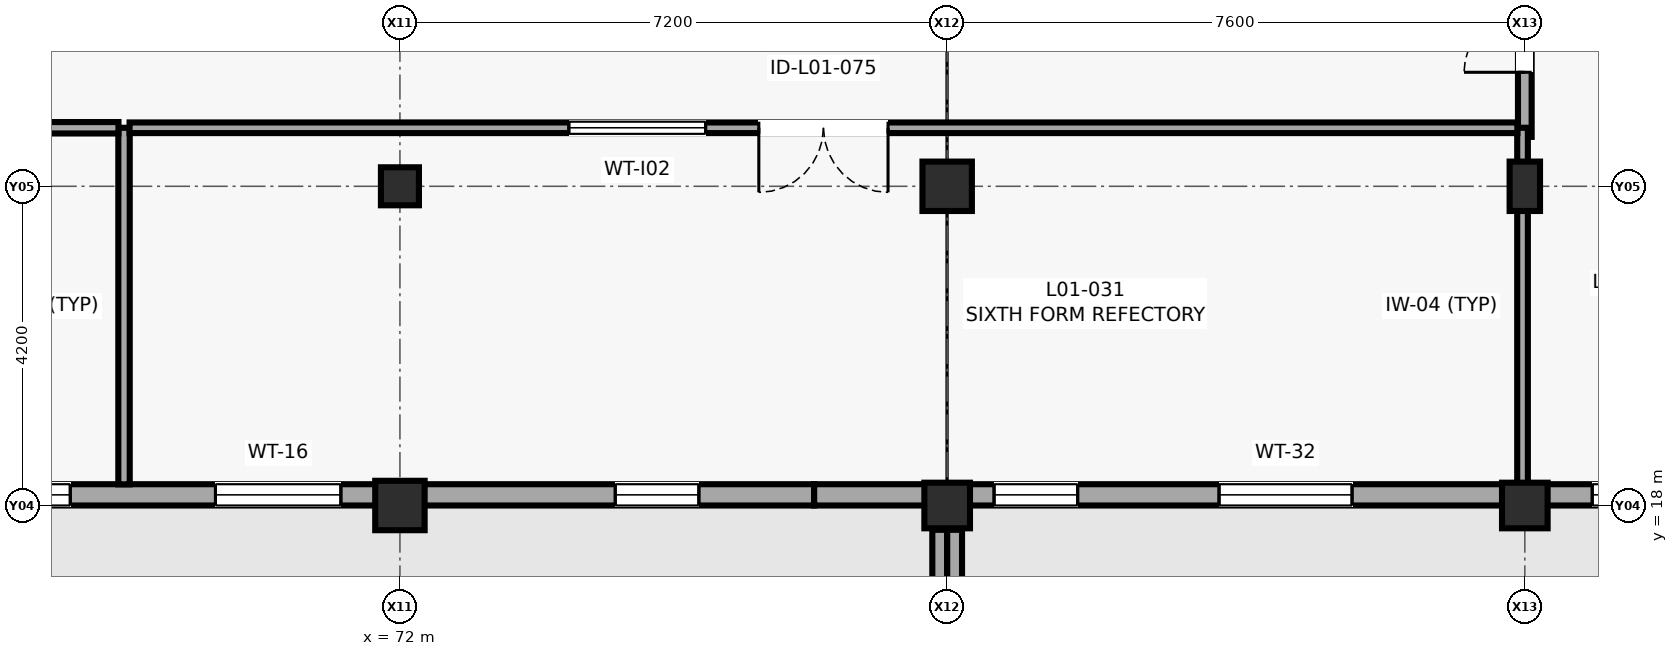
"""IFC4 building model, lengths in metres.
Left out: names, types, materials, properties, quantities, classifications, styles, units other than length and angle.
Written with IfcOpenShell. Run it as: python <this file> out.ifc"""

import sys

from ifc_helpers import new_model, si_unit, direction, frame, frame_2d, origin, origin_2d, place, context, subcontext, project, spatial, polyline, rectangle, outline, extrude, element, fill, save


model = new_model("IFC4")
c1 = context("Model", 3, precision=1e-05, world=origin(), true_north=direction((0.0, 1.0)))
c2 = subcontext(c1, "Body", "Model", "MODEL_VIEW")
j1 = project(units=[si_unit("LENGTHUNIT", "METRE"), si_unit("PLANEANGLEUNIT", "RADIAN")], contexts=[c1])
p1 = place(None, origin())
s1 = spatial("IfcSite", under=j1, at=p1, CompositionType="ELEMENT")
p2 = place(p1, origin())
s2 = spatial("IfcBuilding", under=s1, at=p2, CompositionType="ELEMENT")
p3 = place(p2, frame((0.0, 0.0, 4.2)))
s3 = spatial("IfcBuildingStorey", under=s2, at=p3, CompositionType="ELEMENT", Elevation=4.2)
p4 = place(p3, frame((72.0, 18.0, 0.0), z_axis=(0.0, 0.0, 1.0), x_axis=(1.0, 0.0, 0.0)))
e1 = element("IfcColumn", 1, at=p4, inside=s3, PredefinedType="COLUMN", context=c2, shape_type="SweptSolid", body=[
    extrude(rectangle(XDim=0.65, YDim=0.65, at=origin_2d()), origin(), (0.0, 0.0, 1.0), 4.0),
])
p5 = place(p3, frame((72.0, 22.2, 0.0), z_axis=(0.0, 0.0, 1.0), x_axis=(1.0, 0.0, 0.0)))
e2 = element("IfcColumn", 2, at=p5, inside=s3, PredefinedType="COLUMN", context=c2, shape_type="SweptSolid", body=[
    extrude(rectangle(XDim=0.5, YDim=0.5, at=origin_2d()), origin(), (0.0, 0.0, 1.0), 4.0),
])
p6 = place(p3, frame((79.2, 18.0, 0.0), z_axis=(0.0, 0.0, 1.0), x_axis=(1.0, 0.0, 0.0)))
e3 = element("IfcColumn", 3, at=p6, inside=s3, PredefinedType="COLUMN", context=c2, shape_type="SweptSolid", body=[
    extrude(rectangle(XDim=0.6, YDim=0.6, at=origin_2d()), origin(), (0.0, 0.0, 1.0), 4.0),
])
p7 = place(p3, frame((79.2, 22.2, 0.0), z_axis=(0.0, 0.0, 1.0), x_axis=(1.0, 0.0, 0.0)))
e4 = element("IfcColumn", 4, at=p7, inside=s3, PredefinedType="COLUMN", context=c2, shape_type="SweptSolid", body=[
    extrude(rectangle(XDim=0.65, YDim=0.65, at=origin_2d()), origin(), (0.0, 0.0, 1.0), 4.0),
])
p8 = place(p3, frame((86.8, 18.0, 0.0), z_axis=(0.0, 0.0, 1.0), x_axis=(1.0, 0.0, 0.0)))
e5 = element("IfcColumn", 5, at=p8, inside=s3, PredefinedType="COLUMN", context=c2, shape_type="SweptSolid", body=[
    extrude(rectangle(XDim=0.6, YDim=0.6, at=origin_2d()), origin(), (0.0, 0.0, 1.0), 4.0),
])
p9 = place(p3, frame((86.8, 22.2, 0.0), z_axis=(0.0, 0.0, 1.0), x_axis=(1.0, 0.0, 0.0)))
e6 = element("IfcColumn", 6, at=p9, inside=s3, PredefinedType="COLUMN", context=c2, shape_type="SweptSolid", body=[
    extrude(rectangle(XDim=0.4, YDim=0.65, at=origin_2d()), origin(), (0.0, 0.0, 1.0), 4.0),
])
p10 = place(p3, frame((65.046, 18.14, 0.0), z_axis=(0.0, 0.0, 1.0), x_axis=(1.0, 0.0, 0.0)))
e7 = element("IfcWall", 7, at=p10, inside=s3, PredefinedType="SOLIDWALL", context=c2, shape_type="SweptSolid", body=[
    extrude(rectangle(XDim=12.404, YDim=0.28, at=frame_2d((6.202, 0.0))), origin(), (0.0, 0.0, 1.0), 3.06),
])
p11 = place(p10, frame((0.617, 0.0, 0.75)))
e8 = element("IfcOpeningElement", 8, at=p11, cuts=e7, PredefinedType="OPENING", context=c2, shape_type="SweptSolid", body=[
    extrude(rectangle(XDim=2.0, YDim=2.1, at=frame_2d((1.0, 1.05))), frame((0.0, 0.15, 0.0), z_axis=(0.0, -1.0, 0.0), x_axis=(1.0, 0.0, 0.0)), (0.0, 0.0, 1.0), 0.3),
])
p12 = place(p10, frame((4.527, 0.0, 0.85)))
e9 = element("IfcOpeningElement", 9, at=p12, cuts=e7, PredefinedType="OPENING", context=c2, shape_type="SweptSolid", body=[
    extrude(rectangle(XDim=1.65, YDim=1.95, at=frame_2d((0.825, 0.975))), frame((0.0, 0.15, 0.0), z_axis=(0.0, -1.0, 0.0), x_axis=(1.0, 0.0, 0.0)), (0.0, 0.0, 1.0), 0.3),
])
p13 = place(p10, frame((9.787, 0.0, 0.75)))
e10 = element("IfcOpeningElement", 10, at=p13, cuts=e7, PredefinedType="OPENING", context=c2, shape_type="SweptSolid", body=[
    extrude(rectangle(XDim=1.1, YDim=2.1, at=frame_2d((0.55, 1.05))), frame((0.0, 0.15, 0.0), z_axis=(0.0, -1.0, 0.0), x_axis=(1.0, 0.0, 0.0)), (0.0, 0.0, 1.0), 0.3),
])
p14 = place(p3, frame((77.45, 18.14, 0.0), z_axis=(0.0, 0.0, 1.0), x_axis=(1.0, 0.0, 0.0)))
e11 = element("IfcWall", 11, at=p14, inside=s3, PredefinedType="SOLIDWALL", context=c2, shape_type="SweptSolid", body=[
    extrude(rectangle(XDim=12.404, YDim=0.28, at=frame_2d((6.202, 0.0))), origin(), (0.0, 0.0, 1.0), 2.91),
])
p15 = place(p14, frame((2.367, 0.0, 0.67)))
e12 = element("IfcOpeningElement", 12, at=p15, cuts=e11, PredefinedType="OPENING", context=c2, shape_type="SweptSolid", body=[
    extrude(rectangle(XDim=1.1, YDim=2.1, at=frame_2d((0.55, 1.05))), frame((0.0, 0.15, 0.0), z_axis=(0.0, -1.0, 0.0), x_axis=(1.0, 0.0, 0.0)), (0.0, 0.0, 1.0), 0.3),
])
p16 = place(p14, frame((5.327, 0.0, 0.72)))
e13 = element("IfcOpeningElement", 13, at=p16, cuts=e11, PredefinedType="OPENING", context=c2, shape_type="SweptSolid", body=[
    extrude(rectangle(XDim=1.75, YDim=2.05, at=frame_2d((0.875, 1.025))), frame((0.0, 0.15, 0.0), z_axis=(0.0, -1.0, 0.0), x_axis=(1.0, 0.0, 0.0)), (0.0, 0.0, 1.0), 0.3),
])
p17 = place(p14, frame((10.237, 0.0, 0.67)))
e14 = element("IfcOpeningElement", 14, at=p17, cuts=e11, PredefinedType="OPENING", context=c2, shape_type="SweptSolid", body=[
    extrude(rectangle(XDim=1.1, YDim=2.1, at=frame_2d((0.55, 1.05))), frame((0.0, 0.15, 0.0), z_axis=(0.0, -1.0, 0.0), x_axis=(1.0, 0.0, 0.0)), (0.0, 0.0, 1.0), 0.3),
])
for number, where, z_axis, x_axis in (
    (15, (79.102, 3.796, 0.0), (0.0, 0.0, 1.0), (0.0, 1.0, 0.0)),
    (16, (79.298, 17.68, 0.0), (0.0, 0.0, 1.0), (0.0, -1.0, 0.0)),
):
    element("IfcWall", number, at=place(p3, frame(where, z_axis=z_axis, x_axis=x_axis)), inside=s3, PredefinedType="PARAPET", context=c2, shape_type="SweptSolid", body=[
        extrude(outline(polyline([(0.0, 0.0), (13.884, 0.0), (13.884, 1.12), (9.441, 1.12), (9.391, 1.46), (4.493, 1.46), (4.443, 1.12), (0.0, 1.12), (0.0, 0.0)])), frame((0.0, 0.098, 0.0), z_axis=(0.0, -1.0, 0.0), x_axis=(1.0, 0.0, 0.0)), (0.0, 0.0, 1.0), 0.195),
    ])
p18 = place(p3, frame((86.8, 22.85, 0.0), z_axis=(0.0, 0.0, 1.0), x_axis=(0.0, 1.0, 0.0)))
e17 = element("IfcWall", 17, at=p18, inside=s3, PredefinedType="PARTITIONING", context=c2, shape_type="SweptSolid", body=[
    extrude(rectangle(XDim=3.3, YDim=0.18, at=frame_2d((1.65, 0.0))), origin(), (0.0, 0.0, 1.0), 3.175),
])
p19 = place(p18, frame((0.85, 0.0, 0.0)))
e18 = element("IfcOpeningElement", 18, at=p19, cuts=e17, PredefinedType="OPENING", context=c2, shape_type="SweptSolid", body=[
    extrude(rectangle(XDim=1.6, YDim=2.25, at=frame_2d((0.8, 1.125))), frame((0.0, 0.1, 0.0), z_axis=(0.0, -1.0, 0.0), x_axis=(1.0, 0.0, 0.0)), (0.0, 0.0, 1.0), 0.2),
])
p20 = place(p3, frame((68.37, 18.278, 0.0), z_axis=(0.0, 0.0, 1.0), x_axis=(0.0, 1.0, 0.0)))
e19 = element("IfcWall", 19, at=p20, inside=s3, PredefinedType="PARTITIONING", context=c2, shape_type="SweptSolid", body=[
    extrude(rectangle(XDim=4.692, YDim=0.15, at=frame_2d((2.346, 0.0))), origin(), (0.0, 0.0, 1.0), 3.16),
])
p21 = place(p3, frame((68.297, 22.97, 0.0), z_axis=(0.0, 0.0, 1.0), x_axis=(-1.0, 0.0, 0.0)))
e20 = element("IfcWall", 20, at=p21, inside=s3, PredefinedType="PARTITIONING", context=c2, shape_type="SweptSolid", body=[
    extrude(rectangle(XDim=17.619, YDim=0.15, at=frame_2d((8.81, 0.0))), origin(), (0.0, 0.0, 1.0), 3.76),
])
p22 = place(p21, frame((8.11, 0.0, 0.0)))
e21 = element("IfcOpeningElement", 21, at=p22, cuts=e20, PredefinedType="OPENING", context=c2, shape_type="SweptSolid", body=[
    extrude(rectangle(XDim=1.4, YDim=2.2, at=frame_2d((0.7, 1.1))), frame((0.0, 0.085, 0.0), z_axis=(0.0, -1.0, 0.0), x_axis=(1.0, 0.0, 0.0)), (0.0, 0.0, 1.0), 0.17),
])
p23 = place(p3, frame((86.77, 18.278, 0.0), z_axis=(0.0, 0.0, 1.0), x_axis=(0.0, 1.0, 0.0)))
e22 = element("IfcWall", 22, at=p23, inside=s3, PredefinedType="PARTITIONING", context=c2, shape_type="SweptSolid", body=[
    extrude(rectangle(XDim=4.692, YDim=0.14, at=frame_2d((2.346, 0.0))), origin(), (0.0, 0.0, 1.0), 3.175),
])
p24 = place(p3, frame((86.702, 22.97, 0.0), z_axis=(0.0, 0.0, 1.0), x_axis=(-1.0, 0.0, 0.0)))
e23 = element("IfcWall", 23, at=p24, inside=s3, PredefinedType="PARTITIONING", context=c2, shape_type="SweptSolid", body=[
    extrude(rectangle(XDim=18.259, YDim=0.14, at=frame_2d((9.129, 0.0))), origin(), (0.0, 0.0, 1.0), 3.76),
])
p25 = place(p24, frame((8.28, 0.0, 0.0)))
e24 = element("IfcOpeningElement", 24, at=p25, cuts=e23, PredefinedType="OPENING", context=c2, shape_type="SweptSolid", body=[
    extrude(rectangle(XDim=1.7, YDim=2.35, at=frame_2d((0.85, 1.175))), frame((0.0, 0.08, 0.0), z_axis=(0.0, -1.0, 0.0), x_axis=(1.0, 0.0, 0.0)), (0.0, 0.0, 1.0), 0.16),
])
p26 = place(p24, frame((10.68, 0.0, 1.05)))
e25 = element("IfcOpeningElement", 25, at=p26, cuts=e23, PredefinedType="OPENING", context=c2, shape_type="SweptSolid", body=[
    extrude(rectangle(XDim=1.8, YDim=1.2, at=frame_2d((0.9, 0.6))), frame((0.0, 0.08, 0.0), z_axis=(0.0, -1.0, 0.0), x_axis=(1.0, 0.0, 0.0)), (0.0, 0.0, 1.0), 0.16),
])
p27 = place(p11, origin())
e26 = element("IfcWindow", 26, at=p27, inside=s3, PartitioningType="SINGLE_PANEL", PredefinedType="WINDOW", context=c2, shape_type="SweptSolid", body=[
    extrude(rectangle(XDim=2.0, YDim=2.1, at=frame_2d((1.0, 1.05))), frame((0.0, 0.03, 0.0), z_axis=(0.0, -1.0, 0.0), x_axis=(1.0, 0.0, 0.0)), (0.0, 0.0, 1.0), 0.06),
])
fill(e8, e26)
p28 = place(p12, origin())
e27 = element("IfcWindow", 27, at=p28, inside=s3, PartitioningType="SINGLE_PANEL", PredefinedType="WINDOW", context=c2, shape_type="SweptSolid", body=[
    extrude(rectangle(XDim=1.65, YDim=1.95, at=frame_2d((0.825, 0.975))), frame((0.0, 0.03, 0.0), z_axis=(0.0, -1.0, 0.0), x_axis=(1.0, 0.0, 0.0)), (0.0, 0.0, 1.0), 0.06),
])
fill(e9, e27)
p29 = place(p13, origin())
e28 = element("IfcWindow", 28, at=p29, inside=s3, PartitioningType="SINGLE_PANEL", PredefinedType="WINDOW", context=c2, shape_type="SweptSolid", body=[
    extrude(rectangle(XDim=1.1, YDim=2.1, at=frame_2d((0.55, 1.05))), frame((0.0, 0.03, 0.0), z_axis=(0.0, -1.0, 0.0), x_axis=(1.0, 0.0, 0.0)), (0.0, 0.0, 1.0), 0.06),
])
fill(e10, e28)
p30 = place(p15, origin())
e29 = element("IfcWindow", 29, at=p30, inside=s3, PartitioningType="SINGLE_PANEL", PredefinedType="WINDOW", context=c2, shape_type="SweptSolid", body=[
    extrude(rectangle(XDim=1.1, YDim=2.1, at=frame_2d((0.55, 1.05))), frame((0.0, 0.03, 0.0), z_axis=(0.0, -1.0, 0.0), x_axis=(1.0, 0.0, 0.0)), (0.0, 0.0, 1.0), 0.06),
])
fill(e12, e29)
p31 = place(p16, origin())
e30 = element("IfcWindow", 30, at=p31, inside=s3, PartitioningType="SINGLE_PANEL", PredefinedType="WINDOW", context=c2, shape_type="SweptSolid", body=[
    extrude(rectangle(XDim=1.75, YDim=2.05, at=frame_2d((0.875, 1.025))), frame((0.0, 0.03, 0.0), z_axis=(0.0, -1.0, 0.0), x_axis=(1.0, 0.0, 0.0)), (0.0, 0.0, 1.0), 0.06),
])
fill(e13, e30)
p32 = place(p17, origin())
e31 = element("IfcWindow", 31, at=p32, inside=s3, PartitioningType="SINGLE_PANEL", PredefinedType="WINDOW", context=c2, shape_type="SweptSolid", body=[
    extrude(rectangle(XDim=1.1, YDim=2.1, at=frame_2d((0.55, 1.05))), frame((0.0, 0.03, 0.0), z_axis=(0.0, -1.0, 0.0), x_axis=(1.0, 0.0, 0.0)), (0.0, 0.0, 1.0), 0.06),
])
fill(e14, e31)
p33 = place(p19, origin())
e32 = element("IfcDoor", 32, at=p33, inside=s3, OperationType="DOUBLE_DOOR_SINGLE_SWING", PredefinedType="DOOR", context=c2, shape_type="SweptSolid", body=[
    extrude(rectangle(XDim=1.6, YDim=2.25, at=frame_2d((0.8, 1.125))), frame((0.0, 0.025, 0.0), z_axis=(0.0, -1.0, 0.0), x_axis=(1.0, 0.0, 0.0)), (0.0, 0.0, 1.0), 0.05),
])
fill(e18, e32)
p34 = place(p25, origin())
e33 = element("IfcDoor", 33, at=p34, inside=s3, OperationType="DOUBLE_DOOR_SINGLE_SWING", PredefinedType="DOOR", context=c2, shape_type="SweptSolid", body=[
    extrude(rectangle(XDim=1.7, YDim=2.35, at=frame_2d((0.85, 1.175))), frame((0.0, 0.025, 0.0), z_axis=(0.0, -1.0, 0.0), x_axis=(1.0, 0.0, 0.0)), (0.0, 0.0, 1.0), 0.05),
])
fill(e24, e33)
p35 = place(p26, origin())
e34 = element("IfcWindow", 34, at=p35, inside=s3, PartitioningType="SINGLE_PANEL", PredefinedType="WINDOW", context=c2, shape_type="SweptSolid", body=[
    extrude(rectangle(XDim=1.8, YDim=1.2, at=frame_2d((0.9, 0.6))), frame((0.0, 0.03, 0.0), z_axis=(0.0, -1.0, 0.0), x_axis=(1.0, 0.0, 0.0)), (0.0, 0.0, 1.0), 0.06),
])
fill(e25, e34)
save(model, sys.argv[1])
